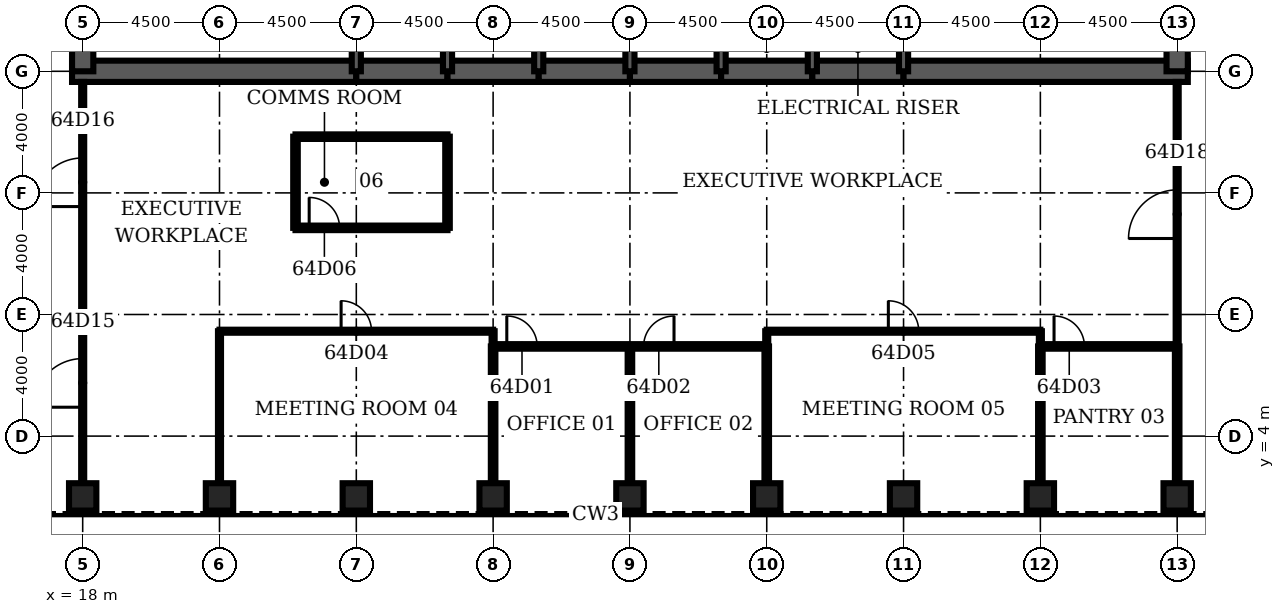
"""IFC4 building model, lengths in metres.
Left out: names, types, materials, properties, quantities, classifications, styles, units other than length and angle.
Written with IfcOpenShell. Run it as: python <this file> out.ifc"""

import sys

from ifc_helpers import new_model, si_unit, direction, frame, frame_2d, origin, origin_2d, place, context, subcontext, project, spatial, rectangle, hollow_rectangle, extrude, element, fill, save


model = new_model("IFC4")
c1 = context("Model", 3, precision=1e-05, world=origin(), true_north=direction((0.0, 1.0)))
c2 = subcontext(c1, "Body", "Model", "MODEL_VIEW")
j1 = project(units=[si_unit("LENGTHUNIT", "METRE"), si_unit("PLANEANGLEUNIT", "RADIAN")], contexts=[c1])
p1 = place(None, origin())
s1 = spatial("IfcSite", under=j1, at=p1, CompositionType="ELEMENT")
p2 = place(p1, origin())
s2 = spatial("IfcBuilding", under=s1, at=p2, CompositionType="ELEMENT")
p3 = place(p2, frame((0.0, 0.0, 283.7)))
s3 = spatial("IfcBuildingStorey", under=s2, at=p3, CompositionType="ELEMENT", Elevation=283.7)
for number, where, z_axis, x_axis in (
    (1, (18.0, 2.0, 0.0), (0.0, 0.0, 1.0), (0.0, 1.0, 0.0)),
    (2, (22.5, 2.0, 0.0), (0.0, 0.0, 1.0), (0.0, 1.0, 0.0)),
    (3, (27.0, 2.0, 0.0), (0.0, 0.0, 1.0), (0.0, 1.0, 0.0)),
    (4, (31.5, 2.0, 0.0), (0.0, 0.0, 1.0), (0.0, 1.0, 0.0)),
    (5, (36.0, 2.0, 0.0), (0.0, 0.0, 1.0), (0.0, 1.0, 0.0)),
    (6, (40.5, 2.0, 0.0), (0.0, 0.0, 1.0), (0.0, 1.0, 0.0)),
    (7, (45.0, 2.0, 0.0), (0.0, 0.0, 1.0), (0.0, 1.0, 0.0)),
    (8, (49.5, 2.0, 0.0), (0.0, 0.0, 1.0), (0.0, 1.0, 0.0)),
    (9, (54.0, 2.0, 0.0), (0.0, 0.0, 1.0), (0.0, 1.0, 0.0)),
):
    element("IfcColumn", number, at=place(p3, frame(where, z_axis=z_axis, x_axis=x_axis)), inside=s3, PredefinedType="COLUMN", context=c2, shape_type="SweptSolid", body=[
        extrude(hollow_rectangle(XDim=0.9, YDim=0.9, WallThickness=0.07, at=origin_2d()), origin(), (0.0, 0.0, 1.0), 4.2),
    ])
p4 = place(p3, frame((17.65, 16.0, 0.0), z_axis=(0.0, 0.0, 1.0), x_axis=(1.0, 0.0, 0.0)))
e10 = element("IfcWall", 10, at=p4, inside=s3, PredefinedType="SHEAR", context=c2, shape_type="SweptSolid", body=[
    extrude(rectangle(XDim=9.35, YDim=0.7, at=frame_2d((4.675, 0.0))), origin(), (0.0, 0.0, 1.0), 4.2),
])
for number, where, z_axis, x_axis in (
    (11, (27.0, 16.0, 0.0), (0.0, 0.0, 1.0), (1.0, 0.0, 0.0)),
    (12, (30.0, 16.0, 0.0), (0.0, 0.0, 1.0), (1.0, 0.0, 0.0)),
    (13, (33.0, 16.0, 0.0), (0.0, 0.0, 1.0), (1.0, 0.0, 0.0)),
    (14, (36.0, 16.0, 0.0), (0.0, 0.0, 1.0), (1.0, 0.0, 0.0)),
    (15, (39.0, 16.0, 0.0), (0.0, 0.0, 1.0), (1.0, 0.0, 0.0)),
    (16, (42.0, 16.0, 0.0), (0.0, 0.0, 1.0), (1.0, 0.0, 0.0)),
):
    element("IfcWall", number, at=place(p3, frame(where, z_axis=z_axis, x_axis=x_axis)), inside=s3, PredefinedType="SHEAR", context=c2, shape_type="SweptSolid", body=[
        extrude(rectangle(XDim=3.0, YDim=0.7, at=frame_2d((1.5, 0.0))), origin(), (0.0, 0.0, 1.0), 4.2),
    ])
p5 = place(p3, frame((45.0, 16.0, 0.0), z_axis=(0.0, 0.0, 1.0), x_axis=(1.0, 0.0, 0.0)))
e17 = element("IfcWall", 17, at=p5, inside=s3, PredefinedType="SHEAR", context=c2, shape_type="SweptSolid", body=[
    extrude(rectangle(XDim=9.35, YDim=0.7, at=frame_2d((4.675, 0.0))), origin(), (0.0, 0.0, 1.0), 4.2),
])
for number, where, z_axis, x_axis in (
    (18, (18.0, 19.2, 0.0), (0.0, 0.0, 1.0), (0.0, -1.0, 0.0)),
    (19, (54.0, 16.0, 0.0), (0.0, 0.0, 1.0), (0.0, 1.0, 0.0)),
):
    element("IfcWall", number, at=place(p3, frame(where, z_axis=z_axis, x_axis=x_axis)), inside=s3, PredefinedType="SHEAR", context=c2, shape_type="SweptSolid", body=[
        extrude(rectangle(XDim=3.2, YDim=0.7, at=frame_2d((1.6, 0.0))), origin(), (0.0, 0.0, 1.0), 4.2),
    ])
for number, where, z_axis, x_axis in (
    (20, (27.0, 16.0, 0.0), (0.0, 0.0, 1.0), (0.0, 1.0, 0.0)),
    (21, (30.0, 16.0, 0.0), (0.0, 0.0, 1.0), (0.0, 1.0, 0.0)),
    (22, (33.0, 16.0, 0.0), (0.0, 0.0, 1.0), (0.0, 1.0, 0.0)),
    (23, (36.0, 16.0, 0.0), (0.0, 0.0, 1.0), (0.0, 1.0, 0.0)),
    (24, (39.0, 16.0, 0.0), (0.0, 0.0, 1.0), (0.0, 1.0, 0.0)),
    (25, (42.0, 16.0, 0.0), (0.0, 0.0, 1.0), (0.0, 1.0, 0.0)),
    (26, (45.0, 16.0, 0.0), (0.0, 0.0, 1.0), (0.0, 1.0, 0.0)),
):
    element("IfcWall", number, at=place(p3, frame(where, z_axis=z_axis, x_axis=x_axis)), inside=s3, PredefinedType="SOLIDWALL", context=c2, shape_type="SweptSolid", body=[
        extrude(rectangle(XDim=3.2, YDim=0.3, at=frame_2d((1.6, 0.0))), origin(), (0.0, 0.0, 1.0), 4.2),
    ])
p6 = place(p3, frame((31.5, 6.95, 0.0), z_axis=(0.0, 0.0, 1.0), x_axis=(1.0, 0.0, 0.0)))
e27 = element("IfcWall", 27, at=p6, inside=s3, PredefinedType="PARTITIONING", context=c2, shape_type="SweptSolid", body=[
    extrude(rectangle(XDim=9.0, YDim=0.15, at=frame_2d((4.5, 0.0))), origin(), (0.0, 0.0, 1.0), 3.0),
])
p7 = place(p6, frame((0.45, 0.0, 0.0)))
e28 = element("IfcOpeningElement", 28, at=p7, cuts=e27, PredefinedType="OPENING", context=c2, shape_type="SweptSolid", body=[
    extrude(rectangle(XDim=1.0, YDim=2.1, at=frame_2d((0.5, 1.05))), frame((0.0, 0.085, 0.0), z_axis=(0.0, -1.0, 0.0), x_axis=(1.0, 0.0, 0.0)), (0.0, 0.0, 1.0), 0.17),
])
p8 = place(p6, frame((4.95, 0.0, 0.0)))
e29 = element("IfcOpeningElement", 29, at=p8, cuts=e27, PredefinedType="OPENING", context=c2, shape_type="SweptSolid", body=[
    extrude(rectangle(XDim=1.0, YDim=2.1, at=frame_2d((0.5, 1.05))), frame((0.0, 0.085, 0.0), z_axis=(0.0, -1.0, 0.0), x_axis=(1.0, 0.0, 0.0)), (0.0, 0.0, 1.0), 0.17),
])
p9 = place(p3, frame((49.5, 6.95, 0.0), z_axis=(0.0, 0.0, 1.0), x_axis=(1.0, 0.0, 0.0)))
e30 = element("IfcWall", 30, at=p9, inside=s3, PredefinedType="PARTITIONING", context=c2, shape_type="SweptSolid", body=[
    extrude(rectangle(XDim=4.5, YDim=0.15, at=frame_2d((2.25, 0.0))), origin(), (0.0, 0.0, 1.0), 3.0),
])
p10 = place(p9, frame((0.45, 0.0, 0.0)))
e31 = element("IfcOpeningElement", 31, at=p10, cuts=e30, PredefinedType="OPENING", context=c2, shape_type="SweptSolid", body=[
    extrude(rectangle(XDim=1.0, YDim=2.1, at=frame_2d((0.5, 1.05))), frame((0.0, 0.085, 0.0), z_axis=(0.0, -1.0, 0.0), x_axis=(1.0, 0.0, 0.0)), (0.0, 0.0, 1.0), 0.17),
])
p11 = place(p3, frame((22.5, 7.45, 0.0), z_axis=(0.0, 0.0, 1.0), x_axis=(1.0, 0.0, 0.0)))
e32 = element("IfcWall", 32, at=p11, inside=s3, PredefinedType="PARTITIONING", context=c2, shape_type="SweptSolid", body=[
    extrude(rectangle(XDim=9.0, YDim=0.1, at=frame_2d((4.5, 0.0))), origin(), (0.0, 0.0, 1.0), 3.0),
])
p12 = place(p11, frame((4.0, 0.0, 0.0)))
e33 = element("IfcOpeningElement", 33, at=p12, cuts=e32, PredefinedType="OPENING", context=c2, shape_type="SweptSolid", body=[
    extrude(rectangle(XDim=1.0, YDim=2.1, at=frame_2d((0.5, 1.05))), frame((0.0, 0.06, 0.0), z_axis=(0.0, -1.0, 0.0), x_axis=(1.0, 0.0, 0.0)), (0.0, 0.0, 1.0), 0.12),
])
p13 = place(p3, frame((40.5, 7.45, 0.0), z_axis=(0.0, 0.0, 1.0), x_axis=(1.0, 0.0, 0.0)))
e34 = element("IfcWall", 34, at=p13, inside=s3, PredefinedType="PARTITIONING", context=c2, shape_type="SweptSolid", body=[
    extrude(rectangle(XDim=9.0, YDim=0.1, at=frame_2d((4.5, 0.0))), origin(), (0.0, 0.0, 1.0), 3.0),
])
p14 = place(p13, frame((4.0, 0.0, 0.0)))
e35 = element("IfcOpeningElement", 35, at=p14, cuts=e34, PredefinedType="OPENING", context=c2, shape_type="SweptSolid", body=[
    extrude(rectangle(XDim=1.0, YDim=2.1, at=frame_2d((0.5, 1.05))), frame((0.0, 0.06, 0.0), z_axis=(0.0, -1.0, 0.0), x_axis=(1.0, 0.0, 0.0)), (0.0, 0.0, 1.0), 0.12),
])
p15 = place(p3, frame((25.0, 10.85, 0.0), z_axis=(0.0, 0.0, 1.0), x_axis=(1.0, 0.0, 0.0)))
e36 = element("IfcWall", 36, at=p15, inside=s3, PredefinedType="PARTITIONING", context=c2, shape_type="SweptSolid", body=[
    extrude(rectangle(XDim=5.0, YDim=0.15, at=frame_2d((2.5, 0.0))), origin(), (0.0, 0.0, 1.0), 3.0),
])
p16 = place(p15, frame((0.45, 0.0, 0.0)))
e37 = element("IfcOpeningElement", 37, at=p16, cuts=e36, PredefinedType="OPENING", context=c2, shape_type="SweptSolid", body=[
    extrude(rectangle(XDim=1.0, YDim=2.1, at=frame_2d((0.5, 1.05))), frame((0.0, 0.085, 0.0), z_axis=(0.0, -1.0, 0.0), x_axis=(1.0, 0.0, 0.0)), (0.0, 0.0, 1.0), 0.17),
])
p17 = place(p3, frame((25.0, 13.85, 0.0), z_axis=(0.0, 0.0, 1.0), x_axis=(1.0, 0.0, 0.0)))
e38 = element("IfcWall", 38, at=p17, inside=s3, PredefinedType="PARTITIONING", context=c2, shape_type="SweptSolid", body=[
    extrude(rectangle(XDim=5.0, YDim=0.15, at=frame_2d((2.5, 0.0))), origin(), (0.0, 0.0, 1.0), 3.0),
])
p18 = place(p3, frame((18.0, 2.45, 0.0), z_axis=(0.0, 0.0, 1.0), x_axis=(0.0, 1.0, 0.0)))
e39 = element("IfcWall", 39, at=p18, inside=s3, PredefinedType="PARTITIONING", context=c2, shape_type="SweptSolid", body=[
    extrude(rectangle(XDim=13.2, YDim=0.1, at=frame_2d((6.6, 0.0))), origin(), (0.0, 0.0, 1.0), 3.0),
])
p19 = place(p18, frame((2.5, 0.0, 0.0)))
e40 = element("IfcOpeningElement", 40, at=p19, cuts=e39, PredefinedType="OPENING", context=c2, shape_type="SweptSolid", body=[
    extrude(rectangle(XDim=1.6, YDim=2.1, at=frame_2d((0.8, 1.05))), frame((0.0, 0.06, 0.0), z_axis=(0.0, -1.0, 0.0), x_axis=(1.0, 0.0, 0.0)), (0.0, 0.0, 1.0), 0.12),
])
p20 = place(p18, frame((9.1, 0.0, 0.0)))
e41 = element("IfcOpeningElement", 41, at=p20, cuts=e39, PredefinedType="OPENING", context=c2, shape_type="SweptSolid", body=[
    extrude(rectangle(XDim=1.6, YDim=2.1, at=frame_2d((0.8, 1.05))), frame((0.0, 0.06, 0.0), z_axis=(0.0, -1.0, 0.0), x_axis=(1.0, 0.0, 0.0)), (0.0, 0.0, 1.0), 0.12),
])
p21 = place(p3, frame((22.5, 2.45, 0.0), z_axis=(0.0, 0.0, 1.0), x_axis=(0.0, 1.0, 0.0)))
e42 = element("IfcWall", 42, at=p21, inside=s3, PredefinedType="PARTITIONING", context=c2, shape_type="SweptSolid", body=[
    extrude(rectangle(XDim=5.0, YDim=0.1, at=frame_2d((2.5, 0.0))), origin(), (0.0, 0.0, 1.0), 3.0),
])
for number, where, z_axis, x_axis in (
    (43, (25.0, 10.85, 0.0), (0.0, 0.0, 1.0), (0.0, 1.0, 0.0)),
    (44, (30.0, 10.85, 0.0), (0.0, 0.0, 1.0), (0.0, 1.0, 0.0)),
):
    element("IfcWall", number, at=place(p3, frame(where, z_axis=z_axis, x_axis=x_axis)), inside=s3, PredefinedType="PARTITIONING", context=c2, shape_type="SweptSolid", body=[
        extrude(rectangle(XDim=3.0, YDim=0.15, at=frame_2d((1.5, 0.0))), origin(), (0.0, 0.0, 1.0), 3.0),
    ])
p22 = place(p3, frame((31.5, 2.45, 0.0), z_axis=(0.0, 0.0, 1.0), x_axis=(0.0, 1.0, 0.0)))
e45 = element("IfcWall", 45, at=p22, inside=s3, PredefinedType="PARTITIONING", context=c2, shape_type="SweptSolid", body=[
    extrude(rectangle(XDim=4.5, YDim=0.15, at=frame_2d((2.25, 0.0))), origin(), (0.0, 0.0, 1.0), 3.0),
])
p23 = place(p3, frame((31.5, 6.95, 0.0), z_axis=(0.0, 0.0, 1.0), x_axis=(0.0, 1.0, 0.0)))
e46 = element("IfcWall", 46, at=p23, inside=s3, PredefinedType="PARTITIONING", context=c2, shape_type="SweptSolid", body=[
    extrude(rectangle(XDim=0.5, YDim=0.1, at=frame_2d((0.25, 0.0))), origin(), (0.0, 0.0, 1.0), 3.0),
])
for number, where, z_axis, x_axis in (
    (47, (36.0, 2.45, 0.0), (0.0, 0.0, 1.0), (0.0, 1.0, 0.0)),
    (48, (40.5, 2.45, 0.0), (0.0, 0.0, 1.0), (0.0, 1.0, 0.0)),
):
    element("IfcWall", number, at=place(p3, frame(where, z_axis=z_axis, x_axis=x_axis)), inside=s3, PredefinedType="PARTITIONING", context=c2, shape_type="SweptSolid", body=[
        extrude(rectangle(XDim=4.5, YDim=0.15, at=frame_2d((2.25, 0.0))), origin(), (0.0, 0.0, 1.0), 3.0),
    ])
p24 = place(p3, frame((40.5, 6.95, 0.0), z_axis=(0.0, 0.0, 1.0), x_axis=(0.0, 1.0, 0.0)))
e49 = element("IfcWall", 49, at=p24, inside=s3, PredefinedType="PARTITIONING", context=c2, shape_type="SweptSolid", body=[
    extrude(rectangle(XDim=0.5, YDim=0.1, at=frame_2d((0.25, 0.0))), origin(), (0.0, 0.0, 1.0), 3.0),
])
p25 = place(p3, frame((49.5, 2.45, 0.0), z_axis=(0.0, 0.0, 1.0), x_axis=(0.0, 1.0, 0.0)))
e50 = element("IfcWall", 50, at=p25, inside=s3, PredefinedType="PARTITIONING", context=c2, shape_type="SweptSolid", body=[
    extrude(rectangle(XDim=4.5, YDim=0.15, at=frame_2d((2.25, 0.0))), origin(), (0.0, 0.0, 1.0), 3.0),
])
p26 = place(p3, frame((49.5, 6.95, 0.0), z_axis=(0.0, 0.0, 1.0), x_axis=(0.0, 1.0, 0.0)))
e51 = element("IfcWall", 51, at=p26, inside=s3, PredefinedType="PARTITIONING", context=c2, shape_type="SweptSolid", body=[
    extrude(rectangle(XDim=0.5, YDim=0.1, at=frame_2d((0.25, 0.0))), origin(), (0.0, 0.0, 1.0), 3.0),
])
p27 = place(p3, frame((54.0, 2.45, 0.0), z_axis=(0.0, 0.0, 1.0), x_axis=(0.0, 1.0, 0.0)))
e52 = element("IfcWall", 52, at=p27, inside=s3, PredefinedType="PARTITIONING", context=c2, shape_type="SweptSolid", body=[
    extrude(rectangle(XDim=4.5, YDim=0.15, at=frame_2d((2.25, 0.0))), origin(), (0.0, 0.0, 1.0), 3.0),
])
p28 = place(p3, frame((54.0, 6.95, 0.0), z_axis=(0.0, 0.0, 1.0), x_axis=(0.0, 1.0, 0.0)))
e53 = element("IfcWall", 53, at=p28, inside=s3, PredefinedType="PARTITIONING", context=c2, shape_type="SweptSolid", body=[
    extrude(rectangle(XDim=8.7, YDim=0.1, at=frame_2d((4.35, 0.0))), origin(), (0.0, 0.0, 1.0), 3.0),
])
p29 = place(p28, frame((3.55, 0.0, 0.0)))
e54 = element("IfcOpeningElement", 54, at=p29, cuts=e53, PredefinedType="OPENING", context=c2, shape_type="SweptSolid", body=[
    extrude(rectangle(XDim=1.6, YDim=2.1, at=frame_2d((0.8, 1.05))), frame((0.0, 0.06, 0.0), z_axis=(0.0, -1.0, 0.0), x_axis=(1.0, 0.0, 0.0)), (0.0, 0.0, 1.0), 0.12),
])
p30 = place(p7, origin())
e55 = element("IfcDoor", 55, at=p30, inside=s3, OperationType="SINGLE_SWING_LEFT", PredefinedType="DOOR", context=c2, shape_type="SweptSolid", body=[
    extrude(rectangle(XDim=1.0, YDim=2.1, at=frame_2d((0.5, 1.05))), frame((0.0, 0.025, 0.0), z_axis=(0.0, -1.0, 0.0), x_axis=(1.0, 0.0, 0.0)), (0.0, 0.0, 1.0), 0.05),
])
fill(e28, e55)
p31 = place(p8, origin())
e56 = element("IfcDoor", 56, at=p31, inside=s3, OperationType="SINGLE_SWING_RIGHT", PredefinedType="DOOR", context=c2, shape_type="SweptSolid", body=[
    extrude(rectangle(XDim=1.0, YDim=2.1, at=frame_2d((0.5, 1.05))), frame((0.0, 0.025, 0.0), z_axis=(0.0, -1.0, 0.0), x_axis=(1.0, 0.0, 0.0)), (0.0, 0.0, 1.0), 0.05),
])
fill(e29, e56)
p32 = place(p10, origin())
e57 = element("IfcDoor", 57, at=p32, inside=s3, OperationType="SINGLE_SWING_LEFT", PredefinedType="DOOR", context=c2, shape_type="SweptSolid", body=[
    extrude(rectangle(XDim=1.0, YDim=2.1, at=frame_2d((0.5, 1.05))), frame((0.0, 0.025, 0.0), z_axis=(0.0, -1.0, 0.0), x_axis=(1.0, 0.0, 0.0)), (0.0, 0.0, 1.0), 0.05),
])
fill(e31, e57)
p33 = place(p12, origin())
e58 = element("IfcDoor", 58, at=p33, inside=s3, OperationType="SINGLE_SWING_LEFT", PredefinedType="DOOR", context=c2, shape_type="SweptSolid", body=[
    extrude(rectangle(XDim=1.0, YDim=2.1, at=frame_2d((0.5, 1.05))), frame((0.0, 0.025, 0.0), z_axis=(0.0, -1.0, 0.0), x_axis=(1.0, 0.0, 0.0)), (0.0, 0.0, 1.0), 0.05),
])
fill(e33, e58)
p34 = place(p14, origin())
e59 = element("IfcDoor", 59, at=p34, inside=s3, OperationType="SINGLE_SWING_LEFT", PredefinedType="DOOR", context=c2, shape_type="SweptSolid", body=[
    extrude(rectangle(XDim=1.0, YDim=2.1, at=frame_2d((0.5, 1.05))), frame((0.0, 0.025, 0.0), z_axis=(0.0, -1.0, 0.0), x_axis=(1.0, 0.0, 0.0)), (0.0, 0.0, 1.0), 0.05),
])
fill(e35, e59)
p35 = place(p16, origin())
e60 = element("IfcDoor", 60, at=p35, inside=s3, OperationType="SINGLE_SWING_LEFT", PredefinedType="DOOR", context=c2, shape_type="SweptSolid", body=[
    extrude(rectangle(XDim=1.0, YDim=2.1, at=frame_2d((0.5, 1.05))), frame((0.0, 0.025, 0.0), z_axis=(0.0, -1.0, 0.0), x_axis=(1.0, 0.0, 0.0)), (0.0, 0.0, 1.0), 0.05),
])
fill(e37, e60)
p36 = place(p19, origin())
e61 = element("IfcDoor", 61, at=p36, inside=s3, OperationType="SINGLE_SWING_LEFT", PredefinedType="DOOR", context=c2, shape_type="SweptSolid", body=[
    extrude(rectangle(XDim=1.6, YDim=2.1, at=frame_2d((0.8, 1.05))), frame((0.0, 0.025, 0.0), z_axis=(0.0, -1.0, 0.0), x_axis=(1.0, 0.0, 0.0)), (0.0, 0.0, 1.0), 0.05),
])
fill(e40, e61)
p37 = place(p20, origin())
e62 = element("IfcDoor", 62, at=p37, inside=s3, OperationType="SINGLE_SWING_LEFT", PredefinedType="DOOR", context=c2, shape_type="SweptSolid", body=[
    extrude(rectangle(XDim=1.6, YDim=2.1, at=frame_2d((0.8, 1.05))), frame((0.0, 0.025, 0.0), z_axis=(0.0, -1.0, 0.0), x_axis=(1.0, 0.0, 0.0)), (0.0, 0.0, 1.0), 0.05),
])
fill(e41, e62)
p38 = place(p29, origin())
e63 = element("IfcDoor", 63, at=p38, inside=s3, OperationType="SINGLE_SWING_LEFT", PredefinedType="DOOR", context=c2, shape_type="SweptSolid", body=[
    extrude(rectangle(XDim=1.6, YDim=2.1, at=frame_2d((0.8, 1.05))), frame((0.0, 0.025, 0.0), z_axis=(0.0, -1.0, 0.0), x_axis=(1.0, 0.0, 0.0)), (0.0, 0.0, 1.0), 0.05),
])
fill(e54, e63)
save(model, sys.argv[1])
